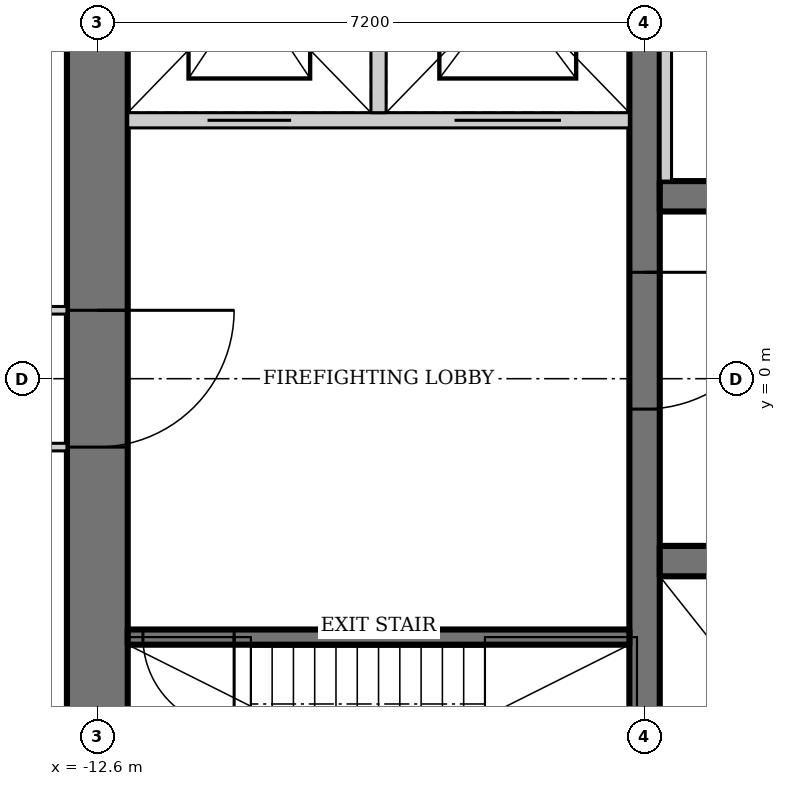
"""IFC4 building model, lengths in metres.
Left out: names, types, materials, properties, quantities, classifications, styles, units other than length and angle.
Written with IfcOpenShell. Run it as: python <this file> out.ifc"""

import sys

from ifc_helpers import new_model, si_unit, direction, frame, frame_2d, origin, place, context, subcontext, project, spatial, rectangle, extrude, element, fill, save


model = new_model("IFC4")
c1 = context("Model", 3, precision=1e-05, world=origin(), true_north=direction((0.0, 1.0)))
c2 = subcontext(c1, "Body", "Model", "MODEL_VIEW")
j1 = project(units=[si_unit("LENGTHUNIT", "METRE"), si_unit("PLANEANGLEUNIT", "RADIAN")], contexts=[c1])
p1 = place(None, origin())
s1 = spatial("IfcSite", under=j1, at=p1, CompositionType="ELEMENT")
p2 = place(p1, origin())
s2 = spatial("IfcBuilding", under=s1, at=p2, CompositionType="ELEMENT")
p3 = place(p2, frame((0.0, 0.0, 207.4)))
s3 = spatial("IfcBuildingStorey", under=s2, at=p3, CompositionType="ELEMENT", Elevation=207.4)
p4 = place(p3, frame((-12.6, 13.0, 0.0), z_axis=(0.0, 0.0, 1.0), x_axis=(0.0, -1.0, 0.0)))
e1 = element("IfcWall", 1, at=p4, inside=s3, PredefinedType="SHEAR", context=c2, shape_type="SweptSolid", body=[
    extrude(rectangle(XDim=26.0, YDim=0.8, at=frame_2d((13.0, 0.0))), origin(), (0.0, 0.0, 1.0), 4.2),
])
p5 = place(p4, frame((12.1, 0.0, 0.0)))
e2 = element("IfcOpeningElement", 2, at=p5, cuts=e1, PredefinedType="OPENING", context=c2, shape_type="SweptSolid", body=[
    extrude(rectangle(XDim=1.8, YDim=2.1, at=frame_2d((0.9, 1.05))), frame((0.0, 0.41, 0.0), z_axis=(0.0, -1.0, 0.0), x_axis=(1.0, 0.0, 0.0)), (0.0, 0.0, 1.0), 0.82),
])
p6 = place(p3, frame((-5.4, 7.8, 0.0), z_axis=(0.0, 0.0, 1.0), x_axis=(0.0, -1.0, 0.0)))
e3 = element("IfcWall", 3, at=p6, inside=s3, PredefinedType="SHEAR", context=c2, shape_type="SweptSolid", body=[
    extrude(rectangle(XDim=14.6, YDim=0.4, at=frame_2d((7.3, 0.0))), origin(), (0.0, 0.0, 1.0), 4.2),
])
p7 = place(p6, frame((6.4, 0.0, 0.0)))
e4 = element("IfcOpeningElement", 4, at=p7, cuts=e3, PredefinedType="OPENING", context=c2, shape_type="SweptSolid", body=[
    extrude(rectangle(XDim=1.8, YDim=2.1, at=frame_2d((0.9, 1.05))), frame((0.0, 0.21, 0.0), z_axis=(0.0, -1.0, 0.0), x_axis=(1.0, 0.0, 0.0)), (0.0, 0.0, 1.0), 0.42),
])
p8 = place(p3, frame((-5.2, -2.4, 0.0), z_axis=(0.0, 0.0, 1.0), x_axis=(1.0, 0.0, 0.0)))
e5 = element("IfcWall", 5, at=p8, inside=s3, PredefinedType="SHEAR", context=c2, shape_type="SweptSolid", body=[
    extrude(rectangle(XDim=10.4, YDim=0.4, at=frame_2d((5.2, 0.0))), origin(), (0.0, 0.0, 1.0), 4.2),
])
p9 = place(p8, frame((1.683, 0.0, 0.0)))
e6 = element("IfcOpeningElement", 6, at=p9, cuts=e5, PredefinedType="OPENING", context=c2, shape_type="SweptSolid", body=[
    extrude(rectangle(XDim=1.1, YDim=2.2, at=frame_2d((0.55, 1.1))), frame((0.0, 0.21, 0.0), z_axis=(0.0, -1.0, 0.0), x_axis=(1.0, 0.0, 0.0)), (0.0, 0.0, 1.0), 0.42),
])
p10 = place(p8, frame((5.217, 0.0, 0.0)))
e7 = element("IfcOpeningElement", 7, at=p10, cuts=e5, PredefinedType="OPENING", context=c2, shape_type="SweptSolid", body=[
    extrude(rectangle(XDim=1.1, YDim=2.2, at=frame_2d((0.55, 1.1))), frame((0.0, 0.21, 0.0), z_axis=(0.0, -1.0, 0.0), x_axis=(1.0, 0.0, 0.0)), (0.0, 0.0, 1.0), 0.42),
])
p11 = place(p8, frame((8.75, 0.0, 0.0)))
e8 = element("IfcOpeningElement", 8, at=p11, cuts=e5, PredefinedType="OPENING", context=c2, shape_type="SweptSolid", body=[
    extrude(rectangle(XDim=1.1, YDim=2.2, at=frame_2d((0.55, 1.1))), frame((0.0, 0.21, 0.0), z_axis=(0.0, -1.0, 0.0), x_axis=(1.0, 0.0, 0.0)), (0.0, 0.0, 1.0), 0.42),
])
p12 = place(p3, frame((5.2, 2.4, 0.0), z_axis=(0.0, 0.0, 1.0), x_axis=(-1.0, 0.0, 0.0)))
e9 = element("IfcWall", 9, at=p12, inside=s3, PredefinedType="SHEAR", context=c2, shape_type="SweptSolid", body=[
    extrude(rectangle(XDim=10.4, YDim=0.4, at=frame_2d((5.2, 0.0))), origin(), (0.0, 0.0, 1.0), 4.2),
])
p13 = place(p3, frame((-5.6, -3.4, 0.0), z_axis=(0.0, 0.0, 1.0), x_axis=(-1.0, 0.0, 0.0)))
e10 = element("IfcWall", 10, at=p13, inside=s3, PredefinedType="SHEAR", context=c2, shape_type="SweptSolid", body=[
    extrude(rectangle(XDim=6.6, YDim=0.2, at=frame_2d((3.3, 0.0))), origin(), (0.0, 0.0, 1.0), 4.2),
])
p14 = place(p13, frame((5.2, 0.0, 0.0)))
e11 = element("IfcOpeningElement", 11, at=p14, cuts=e10, PredefinedType="OPENING", context=c2, shape_type="SweptSolid", body=[
    extrude(rectangle(XDim=1.2, YDim=2.1, at=frame_2d((0.6, 1.05))), frame((0.0, 0.11, 0.0), z_axis=(0.0, -1.0, 0.0), x_axis=(1.0, 0.0, 0.0)), (0.0, 0.0, 1.0), 0.22),
])
p15 = place(p3, frame((-12.2, 3.4, 0.0), z_axis=(0.0, 0.0, 1.0), x_axis=(1.0, 0.0, 0.0)))
e12 = element("IfcWall", 12, at=p15, inside=s3, PredefinedType="SOLIDWALL", context=c2, shape_type="SweptSolid", body=[
    extrude(rectangle(XDim=6.6, YDim=0.2, at=frame_2d((3.3, 0.0))), origin(), (0.0, 0.0, 1.0), 4.2),
])
p16 = place(p15, frame((1.05, 0.0, 0.0)))
e13 = element("IfcOpeningElement", 13, at=p16, cuts=e12, PredefinedType="OPENING", context=c2, shape_type="SweptSolid", body=[
    extrude(rectangle(XDim=1.1, YDim=2.2, at=frame_2d((0.55, 1.1))), frame((0.0, 0.11, 0.0), z_axis=(0.0, -1.0, 0.0), x_axis=(1.0, 0.0, 0.0)), (0.0, 0.0, 1.0), 0.22),
])
p17 = place(p15, frame((4.3, 0.0, 0.0)))
e14 = element("IfcOpeningElement", 14, at=p17, cuts=e12, PredefinedType="OPENING", context=c2, shape_type="SweptSolid", body=[
    extrude(rectangle(XDim=1.4, YDim=2.2, at=frame_2d((0.7, 1.1))), frame((0.0, 0.11, 0.0), z_axis=(0.0, -1.0, 0.0), x_axis=(1.0, 0.0, 0.0)), (0.0, 0.0, 1.0), 0.22),
])
p18 = place(p3, frame((-8.9, 3.5, 0.0), z_axis=(0.0, 0.0, 1.0), x_axis=(0.0, 1.0, 0.0)))
e15 = element("IfcWall", 15, at=p18, inside=s3, PredefinedType="SOLIDWALL", context=c2, shape_type="SweptSolid", body=[
    extrude(rectangle(XDim=3.3, YDim=0.2, at=frame_2d((1.65, 0.0))), origin(), (0.0, 0.0, 1.0), 4.2),
])
p19 = place(p3, frame((-5.12, 2.6, 0.0), z_axis=(0.0, 0.0, 1.0), x_axis=(0.0, 1.0, 0.0)))
e16 = element("IfcWall", 16, at=p19, inside=s3, PredefinedType="SOLIDWALL", context=c2, shape_type="SweptSolid", body=[
    extrude(rectangle(XDim=4.4, YDim=0.15, at=frame_2d((2.2, 0.0))), origin(), (0.0, 0.0, 1.0), 4.05),
])
p20 = place(p3, frame((-13.0, -7.222, 0.0), z_axis=(0.0, 0.0, 1.0), x_axis=(-0.730651186567, 0.682750938167, 0.0)))
e17 = element("IfcWall", 17, at=p20, inside=s3, PredefinedType="PARTITIONING", context=c2, shape_type="SweptSolid", body=[
    extrude(rectangle(XDim=4.603, YDim=0.1, at=frame_2d((2.301, 0.0))), origin(), (0.0, 0.0, 1.0), 4.05),
])
p21 = place(p20, frame((1.851, 0.0, 0.0)))
e18 = element("IfcOpeningElement", 18, at=p21, cuts=e17, PredefinedType="OPENING", context=c2, shape_type="SweptSolid", body=[
    extrude(rectangle(XDim=0.9, YDim=2.1, at=frame_2d((0.45, 1.05))), frame((0.0, 0.06, 0.0), z_axis=(0.0, -1.0, 0.0), x_axis=(1.0, 0.0, 0.0)), (0.0, 0.0, 1.0), 0.12),
])
p22 = place(p3, frame((-16.363, 4.08, 0.0), z_axis=(0.0, 0.0, 1.0), x_axis=(0.730651186567, 0.682750938167, 0.0)))
e19 = element("IfcWall", 19, at=p22, inside=s3, PredefinedType="PARTITIONING", context=c2, shape_type="SweptSolid", body=[
    extrude(rectangle(XDim=4.603, YDim=0.1, at=frame_2d((2.301, 0.0))), origin(), (0.0, 0.0, 1.0), 4.05),
])
p23 = place(p22, frame((1.851, 0.0, 0.0)))
e20 = element("IfcOpeningElement", 20, at=p23, cuts=e19, PredefinedType="OPENING", context=c2, shape_type="SweptSolid", body=[
    extrude(rectangle(XDim=0.9, YDim=2.1, at=frame_2d((0.45, 1.05))), frame((0.0, 0.06, 0.0), z_axis=(0.0, -1.0, 0.0), x_axis=(1.0, 0.0, 0.0)), (0.0, 0.0, 1.0), 0.12),
])
for number, where, z_axis, x_axis in (
    (21, (-15.165, -0.9, 0.0), (0.0, 0.0, 1.0), (1.0, 0.0, 0.0)),
    (22, (-13.0, 0.9, 0.0), (0.0, 0.0, 1.0), (-1.0, 0.0, 0.0)),
):
    element("IfcWall", number, at=place(p3, frame(where, z_axis=z_axis, x_axis=x_axis)), inside=s3, PredefinedType="PARTITIONING", context=c2, shape_type="SweptSolid", body=[
        extrude(rectangle(XDim=2.165, YDim=0.1, at=frame_2d((1.083, 0.0))), origin(), (0.0, 0.0, 1.0), 4.05),
    ])
p24 = place(p7, origin())
e23 = element("IfcDoor", 23, at=p24, inside=s3, OperationType="DOUBLE_DOOR_DOUBLE_SWING", PredefinedType="DOOR", context=c2, shape_type="SweptSolid", body=[
    extrude(rectangle(XDim=1.8, YDim=2.1, at=frame_2d((0.9, 1.05))), frame((0.0, 0.025, 0.0), z_axis=(0.0, -1.0, 0.0), x_axis=(1.0, 0.0, 0.0)), (0.0, 0.0, 1.0), 0.05),
])
fill(e4, e23)
p25 = place(p14, origin())
e24 = element("IfcDoor", 24, at=p25, inside=s3, OperationType="SINGLE_SWING_RIGHT", PredefinedType="DOOR", context=c2, shape_type="SweptSolid", body=[
    extrude(rectangle(XDim=1.2, YDim=2.1, at=frame_2d((0.6, 1.05))), frame((0.0, 0.025, 0.0), z_axis=(0.0, -1.0, 0.0), x_axis=(1.0, 0.0, 0.0)), (0.0, 0.0, 1.0), 0.05),
])
fill(e11, e24)
p26 = place(p5, origin())
e25 = element("IfcDoor", 25, at=p26, inside=s3, OperationType="DOUBLE_DOOR_DOUBLE_SWING", PredefinedType="DOOR", context=c2, shape_type="SweptSolid", body=[
    extrude(rectangle(XDim=1.8, YDim=2.1, at=frame_2d((0.9, 1.05))), frame((0.0, 0.025, 0.0), z_axis=(0.0, -1.0, 0.0), x_axis=(1.0, 0.0, 0.0)), (0.0, 0.0, 1.0), 0.05),
])
fill(e2, e25)
p27 = place(p16, origin())
e26 = element("IfcDoor", 26, at=p27, inside=s3, OperationType="DOUBLE_DOOR_SLIDING", PredefinedType="DOOR", context=c2, shape_type="SweptSolid", body=[
    extrude(rectangle(XDim=1.1, YDim=2.2, at=frame_2d((0.55, 1.1))), frame((0.0, 0.025, 0.0), z_axis=(0.0, -1.0, 0.0), x_axis=(1.0, 0.0, 0.0)), (0.0, 0.0, 1.0), 0.05),
])
fill(e13, e26)
p28 = place(p17, origin())
e27 = element("IfcDoor", 27, at=p28, inside=s3, OperationType="DOUBLE_DOOR_SLIDING", PredefinedType="DOOR", context=c2, shape_type="SweptSolid", body=[
    extrude(rectangle(XDim=1.4, YDim=2.2, at=frame_2d((0.7, 1.1))), frame((0.0, 0.025, 0.0), z_axis=(0.0, -1.0, 0.0), x_axis=(1.0, 0.0, 0.0)), (0.0, 0.0, 1.0), 0.05),
])
fill(e14, e27)
save(model, sys.argv[1])
